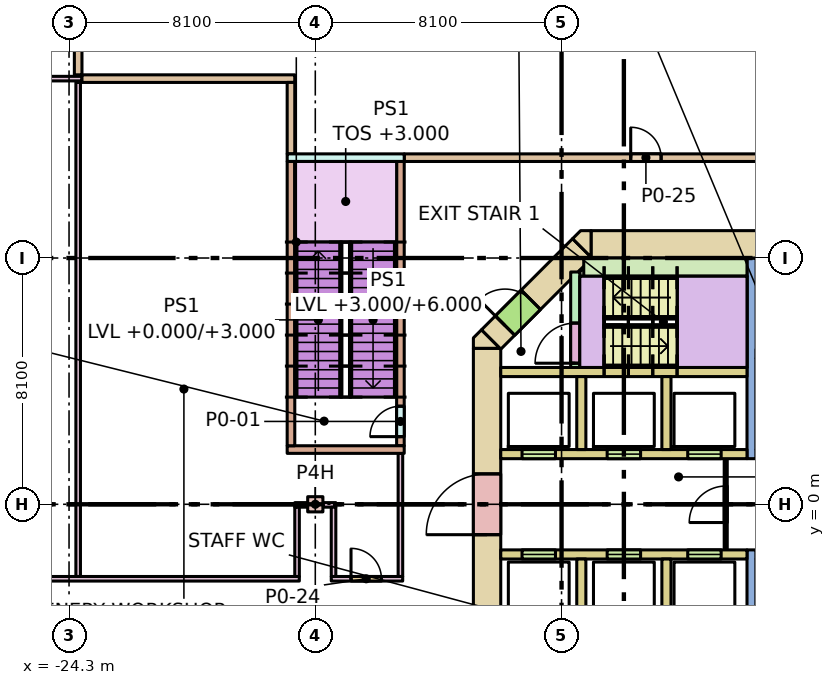
"""IFC4 building model, lengths in metres.
Left out: names, types, materials, properties, quantities, classifications, styles, units other than length and angle.
Written with IfcOpenShell. Run it as: python <this file> out.ifc"""

import sys

from ifc_helpers import new_model, si_unit, direction, frame, frame_2d, origin, origin_2d, place, context, subcontext, project, spatial, polyline, rectangle, outline, extrude, element, fill, save


model = new_model("IFC4")
c1 = context("Model", 3, precision=1e-05, world=origin(), true_north=direction((0.0, 1.0)))
c2 = subcontext(c1, "Body", "Model", "MODEL_VIEW")
j1 = project(units=[si_unit("LENGTHUNIT", "METRE"), si_unit("PLANEANGLEUNIT", "RADIAN")], contexts=[c1])
p1 = place(None, origin())
s1 = spatial("IfcSite", under=j1, at=p1, CompositionType="ELEMENT")
p2 = place(p1, origin())
s2 = spatial("IfcBuilding", under=s1, at=p2, CompositionType="ELEMENT")
p3 = place(p2, origin())
s3 = spatial("IfcBuildingStorey", under=s2, at=p3, CompositionType="ELEMENT", Elevation=0.0)
p4 = place(p3, frame((-16.2, 0.0, 0.0), z_axis=(0.0, 0.0, 1.0), x_axis=(1.0, 0.0, 0.0)))
e1 = element("IfcColumn", 1, at=p4, inside=s3, PredefinedType="COLUMN", context=c2, shape_type="SweptSolid", body=[
    extrude(rectangle(XDim=0.5, YDim=0.5, at=origin_2d()), origin(), (0.0, 0.0, 1.0), 6.0),
])
p5 = place(p3, frame((-7.13, 8.55, -0.32), z_axis=(0.0, 0.0, 1.0), x_axis=(1.0, 0.0, 0.0)))
e2 = element("IfcWall", 2, at=p5, inside=s3, PredefinedType="SHEAR", context=c2, shape_type="SweptSolid", body=[
    extrude(rectangle(XDim=14.26, YDim=0.9, at=frame_2d((7.13, 0.0))), origin(), (0.0, 0.0, 1.0), 6.0),
])
p6 = place(p5, frame((5.48, 0.0, 0.32)))
e3 = element("IfcOpeningElement", 3, at=p6, cuts=e2, PredefinedType="OPENING", context=c2, shape_type="SweptSolid", body=[
    extrude(rectangle(XDim=0.7, YDim=2.1, at=frame_2d((0.35, 1.05))), frame((0.0, 0.46, 0.0), z_axis=(0.0, -1.0, 0.0), x_axis=(1.0, 0.0, 0.0)), (0.0, 0.0, 1.0), 0.92),
])
p7 = place(p5, frame((7.155, 0.0, 0.32)))
e4 = element("IfcOpeningElement", 4, at=p7, cuts=e2, PredefinedType="OPENING", context=c2, shape_type="SweptSolid", body=[
    extrude(rectangle(XDim=0.9, YDim=2.1, at=frame_2d((0.45, 1.05))), frame((0.0, 0.46, 0.0), z_axis=(0.0, -1.0, 0.0), x_axis=(1.0, 0.0, 0.0)), (0.0, 0.0, 1.0), 0.92),
])
p8 = place(p3, frame((-10.55, -5.13, -0.32), z_axis=(0.0, 0.0, 1.0), x_axis=(0.0, 1.0, 0.0)))
e5 = element("IfcWall", 5, at=p8, inside=s3, PredefinedType="SHEAR", context=c2, shape_type="SweptSolid", body=[
    extrude(rectangle(XDim=10.26, YDim=0.9, at=frame_2d((5.13, 0.0))), origin(), (0.0, 0.0, 1.0), 6.0),
])
p9 = place(p8, frame((4.13, 0.0, 0.32)))
e6 = element("IfcOpeningElement", 6, at=p9, cuts=e5, PredefinedType="OPENING", context=c2, shape_type="SweptSolid", body=[
    extrude(rectangle(XDim=2.0, YDim=2.1, at=frame_2d((1.0, 1.05))), frame((0.0, 0.46, 0.0), z_axis=(0.0, -1.0, 0.0), x_axis=(1.0, 0.0, 0.0)), (0.0, 0.0, 1.0), 0.92),
])
p10 = place(p3, frame((-10.418, 5.418, -0.32), z_axis=(0.0, 0.0, 1.0), x_axis=(0.707106781187, 0.707106781187, 0.0)))
e7 = element("IfcWall", 7, at=p10, inside=s3, PredefinedType="SHEAR", context=c2, shape_type="SweptSolid", body=[
    extrude(rectangle(XDim=4.243, YDim=0.9, at=frame_2d((2.121, 0.0))), origin(), (0.0, 0.0, 1.0), 6.0),
])
p11 = place(p10, frame((0.65, 0.0, 0.32)))
e8 = element("IfcOpeningElement", 8, at=p11, cuts=e7, PredefinedType="OPENING", context=c2, shape_type="SweptSolid", body=[
    extrude(rectangle(XDim=1.2, YDim=2.1, at=frame_2d((0.6, 1.05))), frame((0.0, 0.46, 0.0), z_axis=(0.0, -1.0, 0.0), x_axis=(1.0, 0.0, 0.0)), (0.0, 0.0, 1.0), 0.92),
])
p12 = place(p3, frame((0.0, 0.0, -0.32)))
e9 = element("IfcWall", 9, at=p12, inside=s3, PredefinedType="SHEAR", context=c2, shape_type="SweptSolid", body=[
    extrude(outline(polyline([(-10.736, 5.736), (-10.13, 5.13), (-11.0, 5.13), (-11.0, 5.473), (-10.736, 5.736)])), origin(), (0.0, 0.0, 1.0), 6.0),
])
p13 = place(p3, frame((0.0, 0.0, -0.32)))
e10 = element("IfcWall", 10, at=p13, inside=s3, PredefinedType="SHEAR", context=c2, shape_type="SweptSolid", body=[
    extrude(outline(polyline([(-7.473, 9.0), (-7.13, 9.0), (-7.13, 8.13), (-7.736, 8.736), (-7.473, 9.0)])), origin(), (0.0, 0.0, 1.0), 6.0),
])
p14 = place(p3, frame((-10.1, 4.35, 0.0), z_axis=(0.0, 0.0, 1.0), x_axis=(1.0, 0.0, 0.0)))
e11 = element("IfcWall", 11, at=p14, inside=s3, PredefinedType="SOLIDWALL", context=c2, shape_type="SweptSolid", body=[
    extrude(rectangle(XDim=8.1, YDim=0.3, at=frame_2d((4.05, 0.0))), origin(), (0.0, 0.0, 1.0), 5.68),
])
p15 = place(p3, frame((-10.1, 1.65, 0.0), z_axis=(0.0, 0.0, 1.0), x_axis=(1.0, 0.0, 0.0)))
e12 = element("IfcWall", 12, at=p15, inside=s3, PredefinedType="SOLIDWALL", context=c2, shape_type="SweptSolid", body=[
    extrude(rectangle(XDim=8.1, YDim=0.3, at=frame_2d((4.05, 0.0))), origin(), (0.0, 0.0, 1.0), 5.68),
])
p16 = place(p15, frame((0.7, 0.0, 0.0)))
e13 = element("IfcOpeningElement", 13, at=p16, cuts=e12, PredefinedType="OPENING", context=c2, shape_type="SweptSolid", body=[
    extrude(rectangle(XDim=1.1, YDim=2.1, at=frame_2d((0.55, 1.05))), frame((0.0, 0.16, 0.0), z_axis=(0.0, -1.0, 0.0), x_axis=(1.0, 0.0, 0.0)), (0.0, 0.0, 1.0), 0.32),
])
p17 = place(p15, frame((3.5, 0.0, 0.0)))
e14 = element("IfcOpeningElement", 14, at=p17, cuts=e12, PredefinedType="OPENING", context=c2, shape_type="SweptSolid", body=[
    extrude(rectangle(XDim=1.1, YDim=2.1, at=frame_2d((0.55, 1.05))), frame((0.0, 0.16, 0.0), z_axis=(0.0, -1.0, 0.0), x_axis=(1.0, 0.0, 0.0)), (0.0, 0.0, 1.0), 0.32),
])
p18 = place(p15, frame((6.15, 0.0, 0.0)))
e15 = element("IfcOpeningElement", 15, at=p18, cuts=e12, PredefinedType="OPENING", context=c2, shape_type="SweptSolid", body=[
    extrude(rectangle(XDim=1.1, YDim=2.1, at=frame_2d((0.55, 1.05))), frame((0.0, 0.16, 0.0), z_axis=(0.0, -1.0, 0.0), x_axis=(1.0, 0.0, 0.0)), (0.0, 0.0, 1.0), 0.32),
])
p19 = place(p3, frame((-10.1, -1.65, 0.0), z_axis=(0.0, 0.0, 1.0), x_axis=(1.0, 0.0, 0.0)))
e16 = element("IfcWall", 16, at=p19, inside=s3, PredefinedType="SOLIDWALL", context=c2, shape_type="SweptSolid", body=[
    extrude(rectangle(XDim=8.1, YDim=0.3, at=frame_2d((4.05, 0.0))), origin(), (0.0, 0.0, 1.0), 5.68),
])
p20 = place(p19, frame((0.7, 0.0, 0.0)))
e17 = element("IfcOpeningElement", 17, at=p20, cuts=e16, PredefinedType="OPENING", context=c2, shape_type="SweptSolid", body=[
    extrude(rectangle(XDim=1.1, YDim=2.1, at=frame_2d((0.55, 1.05))), frame((0.0, 0.16, 0.0), z_axis=(0.0, -1.0, 0.0), x_axis=(1.0, 0.0, 0.0)), (0.0, 0.0, 1.0), 0.32),
])
p21 = place(p19, frame((3.5, 0.0, 0.0)))
e18 = element("IfcOpeningElement", 18, at=p21, cuts=e16, PredefinedType="OPENING", context=c2, shape_type="SweptSolid", body=[
    extrude(rectangle(XDim=1.1, YDim=2.1, at=frame_2d((0.55, 1.05))), frame((0.0, 0.16, 0.0), z_axis=(0.0, -1.0, 0.0), x_axis=(1.0, 0.0, 0.0)), (0.0, 0.0, 1.0), 0.32),
])
p22 = place(p19, frame((6.15, 0.0, 0.0)))
e19 = element("IfcOpeningElement", 19, at=p22, cuts=e16, PredefinedType="OPENING", context=c2, shape_type="SweptSolid", body=[
    extrude(rectangle(XDim=1.1, YDim=2.1, at=frame_2d((0.55, 1.05))), frame((0.0, 0.16, 0.0), z_axis=(0.0, -1.0, 0.0), x_axis=(1.0, 0.0, 0.0)), (0.0, 0.0, 1.0), 0.32),
])
for number, where, z_axis, x_axis in (
    (20, (-7.45, 1.8, 0.0), (0.0, 0.0, 1.0), (0.0, 1.0, 0.0)),
    (21, (-7.45, -4.2, 0.0), (0.0, 0.0, 1.0), (0.0, 1.0, 0.0)),
    (22, (-4.65, 1.8, 0.0), (0.0, 0.0, 1.0), (0.0, 1.0, 0.0)),
    (23, (-4.65, -4.2, 0.0), (0.0, 0.0, 1.0), (0.0, 1.0, 0.0)),
):
    element("IfcWall", number, at=place(p3, frame(where, z_axis=z_axis, x_axis=x_axis)), inside=s3, PredefinedType="SOLIDWALL", context=c2, shape_type="SweptSolid", body=[
        extrude(rectangle(XDim=2.4, YDim=0.3, at=frame_2d((1.2, 0.0))), origin(), (0.0, 0.0, 1.0), 5.68),
    ])
for number, where, z_axis, x_axis in (
    (24, (-1.85, 1.5, 0.0), (0.0, 0.0, 1.0), (0.0, 1.0, 0.0)),
    (25, (-1.85, -8.1, 0.0), (0.0, 0.0, 1.0), (0.0, 1.0, 0.0)),
):
    element("IfcWall", number, at=place(p3, frame(where, z_axis=z_axis, x_axis=x_axis)), inside=s3, PredefinedType="SHEAR", context=c2, shape_type="SweptSolid", body=[
        extrude(rectangle(XDim=6.6, YDim=0.3, at=frame_2d((3.3, 0.0))), origin(), (0.0, 0.0, 1.0), 5.68),
    ])
p23 = place(p3, frame((-7.65, 4.5, 0.0), z_axis=(0.0, 0.0, 1.0), x_axis=(0.0, 1.0, 0.0)))
e26 = element("IfcWall", 26, at=p23, inside=s3, PredefinedType="SHEAR", context=c2, shape_type="SweptSolid", body=[
    extrude(rectangle(XDim=3.14, YDim=0.3, at=frame_2d((1.57, 0.0))), origin(), (0.0, 0.0, 1.0), 5.68),
])
p24 = place(p23, frame((0.14, 0.0, 0.0)))
e27 = element("IfcOpeningElement", 27, at=p24, cuts=e26, PredefinedType="OPENING", context=c2, shape_type="SweptSolid", body=[
    extrude(rectangle(XDim=1.32, YDim=2.1, at=frame_2d((0.66, 1.05))), frame((0.0, 0.16, 0.0), z_axis=(0.0, -1.0, 0.0), x_axis=(1.0, 0.0, 0.0)), (0.0, 0.0, 1.0), 0.32),
])
p25 = place(p3, frame((-7.37, 7.8, 0.0), z_axis=(0.0, 0.0, 1.0), x_axis=(1.0, 0.0, 0.0)))
e28 = element("IfcWall", 28, at=p25, inside=s3, PredefinedType="SHEAR", context=c2, shape_type="SweptSolid", body=[
    extrude(rectangle(XDim=5.37, YDim=0.6, at=frame_2d((2.685, 0.0))), origin(), (0.0, 0.0, 1.0), 5.68),
])
p26 = place(p3, frame((-7.5, 7.6, 0.0), z_axis=(0.0, 0.0, 1.0), x_axis=(1.0, 0.0, 0.0)))
e29 = element("IfcWall", 29, at=p26, inside=s3, PredefinedType="SHEAR", context=c2, shape_type="SweptSolid", body=[
    extrude(rectangle(XDim=0.6, YDim=0.2, at=frame_2d((0.3, 0.0))), origin(), (0.0, 0.0, 1.0), 5.68),
])
p27 = place(p3, frame((-2.7, -1.5, 0.0), z_axis=(0.0, 0.0, 1.0), x_axis=(0.0, 1.0, 0.0)))
e30 = element("IfcWall", 30, at=p27, inside=s3, PredefinedType="PARTITIONING", context=c2, shape_type="SweptSolid", body=[
    extrude(rectangle(XDim=3.0, YDim=0.1, at=frame_2d((1.5, 0.0))), origin(), (0.0, 0.0, 1.0), 5.68),
])
p28 = place(p27, frame((0.9, 0.0, 0.0)))
e31 = element("IfcOpeningElement", 31, at=p28, cuts=e30, PredefinedType="OPENING", context=c2, shape_type="SweptSolid", body=[
    extrude(rectangle(XDim=1.2, YDim=2.1, at=frame_2d((0.6, 1.05))), frame((0.0, 0.06, 0.0), z_axis=(0.0, -1.0, 0.0), x_axis=(1.0, 0.0, 0.0)), (0.0, 0.0, 1.0), 0.12),
])
p29 = place(p3, frame((-37.5, 14.0, 0.0), z_axis=(0.0, 0.0, 1.0), x_axis=(1.0, 0.0, 0.0)))
e32 = element("IfcWall", 32, at=p29, inside=s3, PredefinedType="PARTITIONING", context=c2, shape_type="SweptSolid", body=[
    extrude(rectangle(XDim=13.625, YDim=0.15, at=frame_2d((6.812, 0.0))), origin(), (0.0, 0.0, 1.0), 5.68),
])
p30 = place(p29, frame((5.95, 0.0, 0.0)))
e33 = element("IfcOpeningElement", 33, at=p30, cuts=e32, PredefinedType="OPENING", context=c2, shape_type="SweptSolid", body=[
    extrude(rectangle(XDim=1.8, YDim=2.4, at=frame_2d((0.9, 1.2))), frame((0.0, 0.085, 0.0), z_axis=(0.0, -1.0, 0.0), x_axis=(1.0, 0.0, 0.0)), (0.0, 0.0, 1.0), 0.17),
])
p31 = place(p3, frame((-24.0, -2.375, 0.0), z_axis=(0.0, 0.0, 1.0), x_axis=(0.0, 1.0, 0.0)))
e34 = element("IfcWall", 34, at=p31, inside=s3, PredefinedType="PARTITIONING", context=c2, shape_type="SweptSolid", body=[
    extrude(rectangle(XDim=16.25, YDim=0.15, at=frame_2d((8.125, 0.0))), origin(), (0.0, 0.0, 1.0), 5.68),
])
p32 = place(p3, frame((-25.425, -2.45, 0.0), z_axis=(0.0, 0.0, 1.0), x_axis=(1.0, 0.0, 0.0)))
e35 = element("IfcWall", 35, at=p32, inside=s3, PredefinedType="PARTITIONING", context=c2, shape_type="SweptSolid", body=[
    extrude(rectangle(XDim=8.7, YDim=0.15, at=frame_2d((4.35, 0.0))), origin(), (0.0, 0.0, 1.0), 5.68),
])
p33 = place(p3, frame((-24.0, 14.125, 0.0), z_axis=(0.0, 0.0, 1.0), x_axis=(0.0, 1.0, 0.0)))
e36 = element("IfcWall", 36, at=p33, inside=s3, PredefinedType="PARTITIONING", context=c2, shape_type="SweptSolid", body=[
    extrude(rectangle(XDim=1.815, YDim=0.25, at=frame_2d((0.907, 0.0))), origin(), (0.0, 0.0, 1.0), 5.68),
])
p34 = place(p3, frame((-17.125, 11.4, 0.0), z_axis=(0.0, 0.0, 1.0), x_axis=(1.0, 0.0, 0.0)))
e37 = element("IfcWall", 37, at=p34, inside=s3, PredefinedType="STANDARD", context=c2, shape_type="SweptSolid", body=[
    extrude(rectangle(XDim=3.85, YDim=0.25, at=frame_2d((1.925, 0.0))), origin(), (0.0, 0.0, 1.0), 5.68),
])
p35 = place(p3, frame((-13.275, 11.4, 0.0), z_axis=(0.0, 0.0, 1.0), x_axis=(1.0, 0.0, 0.0)))
e38 = element("IfcWall", 38, at=p35, inside=s3, PredefinedType="PARTITIONING", context=c2, shape_type="SweptSolid", body=[
    extrude(rectangle(XDim=15.85, YDim=0.25, at=frame_2d((7.925, 0.0))), origin(), (0.0, 0.0, 1.0), 5.68),
])
p36 = place(p35, frame((7.45, 0.0, 0.0)))
e39 = element("IfcOpeningElement", 39, at=p36, cuts=e38, PredefinedType="OPENING", context=c2, shape_type="SweptSolid", body=[
    extrude(rectangle(XDim=1.0, YDim=2.1, at=frame_2d((0.5, 1.05))), frame((0.0, 0.135, 0.0), z_axis=(0.0, -1.0, 0.0), x_axis=(1.0, 0.0, 0.0)), (0.0, 0.0, 1.0), 0.27),
])
p37 = place(p3, frame((-23.875, 14.0, 0.0), z_axis=(0.0, 0.0, 1.0), x_axis=(1.0, 0.0, 0.0)))
e40 = element("IfcWall", 40, at=p37, inside=s3, PredefinedType="PARTITIONING", context=c2, shape_type="SweptSolid", body=[
    extrude(rectangle(XDim=7.0, YDim=0.25, at=frame_2d((3.5, 0.0))), origin(), (0.0, 0.0, 1.0), 5.68),
])
p38 = place(p3, frame((-17.0, 11.525, 0.0), z_axis=(0.0, 0.0, 1.0), x_axis=(0.0, 1.0, 0.0)))
e41 = element("IfcWall", 41, at=p38, inside=s3, PredefinedType="PARTITIONING", context=c2, shape_type="SweptSolid", body=[
    extrude(rectangle(XDim=2.35, YDim=0.25, at=frame_2d((1.175, 0.0))), origin(), (0.0, 0.0, 1.0), 5.68),
])
p39 = place(p3, frame((-13.4, 1.925, 0.0), z_axis=(0.0, 0.0, 1.0), x_axis=(0.0, 1.0, 0.0)))
e42 = element("IfcWall", 42, at=p39, inside=s3, PredefinedType="STANDARD", context=c2, shape_type="SweptSolid", body=[
    extrude(rectangle(XDim=9.35, YDim=0.25, at=frame_2d((4.675, 0.0))), origin(), (0.0, 0.0, 1.0), 5.68),
])
p40 = place(p39, frame((0.3, 0.0, 0.0)))
e43 = element("IfcOpeningElement", 43, at=p40, cuts=e42, PredefinedType="OPENING", context=c2, shape_type="SweptSolid", body=[
    extrude(rectangle(XDim=1.0, YDim=2.1, at=frame_2d((0.5, 1.05))), frame((0.0, 0.135, 0.0), z_axis=(0.0, -1.0, 0.0), x_axis=(1.0, 0.0, 0.0)), (0.0, 0.0, 1.0), 0.27),
])
p41 = place(p3, frame((-17.125, 1.8, 0.0), z_axis=(0.0, 0.0, 1.0), x_axis=(1.0, 0.0, 0.0)))
e44 = element("IfcWall", 44, at=p41, inside=s3, PredefinedType="STANDARD", context=c2, shape_type="SweptSolid", body=[
    extrude(rectangle(XDim=3.85, YDim=0.25, at=frame_2d((1.925, 0.0))), origin(), (0.0, 0.0, 1.0), 5.68),
])
p42 = place(p3, frame((-17.0, 1.925, 0.0), z_axis=(0.0, 0.0, 1.0), x_axis=(0.0, 1.0, 0.0)))
e45 = element("IfcWall", 45, at=p42, inside=s3, PredefinedType="STANDARD", context=c2, shape_type="SweptSolid", body=[
    extrude(rectangle(XDim=9.35, YDim=0.25, at=frame_2d((4.675, 0.0))), origin(), (0.0, 0.0, 1.0), 5.68),
])
p43 = place(p3, frame((-13.4, -2.375, 0.0), z_axis=(0.0, 0.0, 1.0), x_axis=(0.0, 1.0, 0.0)))
e46 = element("IfcWall", 46, at=p43, inside=s3, PredefinedType="PARTITIONING", context=c2, shape_type="SweptSolid", body=[
    extrude(rectangle(XDim=4.05, YDim=0.15, at=frame_2d((2.025, 0.0))), origin(), (0.0, 0.0, 1.0), 5.68),
])
p44 = place(p3, frame((-15.675, -2.45, 0.0), z_axis=(0.0, 0.0, 1.0), x_axis=(1.0, 0.0, 0.0)))
e47 = element("IfcWall", 47, at=p44, inside=s3, PredefinedType="PARTITIONING", context=c2, shape_type="SweptSolid", body=[
    extrude(rectangle(XDim=2.35, YDim=0.15, at=frame_2d((1.175, 0.0))), origin(), (0.0, 0.0, 1.0), 5.68),
])
p45 = place(p44, frame((0.65, 0.0, 0.0)))
e48 = element("IfcOpeningElement", 48, at=p45, cuts=e47, PredefinedType="OPENING", context=c2, shape_type="SweptSolid", body=[
    extrude(rectangle(XDim=1.0, YDim=2.1, at=frame_2d((0.5, 1.05))), frame((0.0, 0.085, 0.0), z_axis=(0.0, -1.0, 0.0), x_axis=(1.0, 0.0, 0.0)), (0.0, 0.0, 1.0), 0.17),
])
for number, where, z_axis, x_axis in (
    (49, (-16.875, -0.02, 0.0), (0.0, 0.0, 1.0), (1.0, 0.0, 0.0)),
    (50, (-15.94, -0.02, 0.0), (0.0, 0.0, 1.0), (1.0, 0.0, 0.0)),
):
    element("IfcWall", number, at=place(p3, frame(where, z_axis=z_axis, x_axis=x_axis)), inside=s3, PredefinedType="PARTITIONING", context=c2, shape_type="SweptSolid", body=[
        extrude(rectangle(XDim=0.415, YDim=0.15, at=frame_2d((0.208, 0.0))), origin(), (0.0, 0.0, 1.0), 5.68),
    ])
for number, where, z_axis, x_axis in (
    (51, (-16.8, -2.375, 0.0), (0.0, 0.0, 1.0), (0.0, 1.0, 0.0)),
    (52, (-15.6, -2.375, 0.0), (0.0, 0.0, 1.0), (0.0, 1.0, 0.0)),
):
    element("IfcWall", number, at=place(p3, frame(where, z_axis=z_axis, x_axis=x_axis)), inside=s3, PredefinedType="PARTITIONING", context=c2, shape_type="SweptSolid", body=[
        extrude(rectangle(XDim=2.28, YDim=0.15, at=frame_2d((1.14, 0.0))), origin(), (0.0, 0.0, 1.0), 5.68),
    ])
p46 = place(p16, origin())
e53 = element("IfcDoor", 53, at=p46, inside=s3, OperationType="DOUBLE_DOOR_SLIDING", PredefinedType="DOOR", context=c2, shape_type="SweptSolid", body=[
    extrude(rectangle(XDim=1.1, YDim=2.1, at=frame_2d((0.55, 1.05))), frame((0.0, 0.025, 0.0), z_axis=(0.0, -1.0, 0.0), x_axis=(1.0, 0.0, 0.0)), (0.0, 0.0, 1.0), 0.05),
])
fill(e13, e53)
p47 = place(p17, origin())
e54 = element("IfcDoor", 54, at=p47, inside=s3, OperationType="DOUBLE_DOOR_SLIDING", PredefinedType="DOOR", context=c2, shape_type="SweptSolid", body=[
    extrude(rectangle(XDim=1.1, YDim=2.1, at=frame_2d((0.55, 1.05))), frame((0.0, 0.025, 0.0), z_axis=(0.0, -1.0, 0.0), x_axis=(1.0, 0.0, 0.0)), (0.0, 0.0, 1.0), 0.05),
])
fill(e14, e54)
p48 = place(p18, origin())
e55 = element("IfcDoor", 55, at=p48, inside=s3, OperationType="DOUBLE_DOOR_SLIDING", PredefinedType="DOOR", context=c2, shape_type="SweptSolid", body=[
    extrude(rectangle(XDim=1.1, YDim=2.1, at=frame_2d((0.55, 1.05))), frame((0.0, 0.025, 0.0), z_axis=(0.0, -1.0, 0.0), x_axis=(1.0, 0.0, 0.0)), (0.0, 0.0, 1.0), 0.05),
])
fill(e15, e55)
p49 = place(p20, origin())
e56 = element("IfcDoor", 56, at=p49, inside=s3, OperationType="DOUBLE_DOOR_SLIDING", PredefinedType="DOOR", context=c2, shape_type="SweptSolid", body=[
    extrude(rectangle(XDim=1.1, YDim=2.1, at=frame_2d((0.55, 1.05))), frame((0.0, 0.025, 0.0), z_axis=(0.0, -1.0, 0.0), x_axis=(1.0, 0.0, 0.0)), (0.0, 0.0, 1.0), 0.05),
])
fill(e17, e56)
p50 = place(p21, origin())
e57 = element("IfcDoor", 57, at=p50, inside=s3, OperationType="DOUBLE_DOOR_SLIDING", PredefinedType="DOOR", context=c2, shape_type="SweptSolid", body=[
    extrude(rectangle(XDim=1.1, YDim=2.1, at=frame_2d((0.55, 1.05))), frame((0.0, 0.025, 0.0), z_axis=(0.0, -1.0, 0.0), x_axis=(1.0, 0.0, 0.0)), (0.0, 0.0, 1.0), 0.05),
])
fill(e18, e57)
p51 = place(p22, origin())
e58 = element("IfcDoor", 58, at=p51, inside=s3, OperationType="DOUBLE_DOOR_SLIDING", PredefinedType="DOOR", context=c2, shape_type="SweptSolid", body=[
    extrude(rectangle(XDim=1.1, YDim=2.1, at=frame_2d((0.55, 1.05))), frame((0.0, 0.025, 0.0), z_axis=(0.0, -1.0, 0.0), x_axis=(1.0, 0.0, 0.0)), (0.0, 0.0, 1.0), 0.05),
])
fill(e19, e58)
p52 = place(p24, origin())
e59 = element("IfcDoor", 59, at=p52, inside=s3, OperationType="DOUBLE_DOOR_SINGLE_SWING", PredefinedType="DOOR", context=c2, shape_type="SweptSolid", body=[
    extrude(rectangle(XDim=1.32, YDim=2.1, at=frame_2d((0.66, 1.05))), frame((0.0, 0.025, 0.0), z_axis=(0.0, -1.0, 0.0), x_axis=(1.0, 0.0, 0.0)), (0.0, 0.0, 1.0), 0.05),
])
fill(e27, e59)
p53 = place(p11, origin())
e60 = element("IfcDoor", 60, at=p53, inside=s3, OperationType="SINGLE_SWING_LEFT", PredefinedType="DOOR", context=c2, shape_type="SweptSolid", body=[
    extrude(rectangle(XDim=1.2, YDim=2.1, at=frame_2d((0.6, 1.05))), frame((0.0, 0.025, 0.0), z_axis=(0.0, -1.0, 0.0), x_axis=(1.0, 0.0, 0.0)), (0.0, 0.0, 1.0), 0.05),
])
fill(e8, e60)
p54 = place(p9, origin())
e61 = element("IfcDoor", 61, at=p54, inside=s3, OperationType="DOUBLE_DOOR_SINGLE_SWING", PredefinedType="DOOR", context=c2, shape_type="SweptSolid", body=[
    extrude(rectangle(XDim=2.0, YDim=2.1, at=frame_2d((1.0, 1.05))), frame((0.0, 0.025, 0.0), z_axis=(0.0, -1.0, 0.0), x_axis=(1.0, 0.0, 0.0)), (0.0, 0.0, 1.0), 0.05),
])
fill(e6, e61)
p55 = place(p28, origin())
e62 = element("IfcDoor", 62, at=p55, inside=s3, OperationType="SINGLE_SWING_LEFT", PredefinedType="DOOR", context=c2, shape_type="SweptSolid", body=[
    extrude(rectangle(XDim=1.2, YDim=2.1, at=frame_2d((0.6, 1.05))), frame((0.0, 0.025, 0.0), z_axis=(0.0, -1.0, 0.0), x_axis=(1.0, 0.0, 0.0)), (0.0, 0.0, 1.0), 0.05),
])
fill(e31, e62)
p56 = place(p40, origin())
e63 = element("IfcDoor", 63, at=p56, inside=s3, OperationType="SINGLE_SWING_LEFT", PredefinedType="DOOR", context=c2, shape_type="SweptSolid", body=[
    extrude(rectangle(XDim=1.0, YDim=2.1, at=frame_2d((0.5, 1.05))), frame((0.0, 0.025, 0.0), z_axis=(0.0, -1.0, 0.0), x_axis=(1.0, 0.0, 0.0)), (0.0, 0.0, 1.0), 0.05),
])
fill(e43, e63)
p57 = place(p45, origin())
e64 = element("IfcDoor", 64, at=p57, inside=s3, OperationType="SINGLE_SWING_LEFT", PredefinedType="DOOR", context=c2, shape_type="SweptSolid", body=[
    extrude(rectangle(XDim=1.0, YDim=2.1, at=frame_2d((0.5, 1.05))), frame((0.0, 0.025, 0.0), z_axis=(0.0, -1.0, 0.0), x_axis=(1.0, 0.0, 0.0)), (0.0, 0.0, 1.0), 0.05),
])
fill(e48, e64)
p58 = place(p36, origin())
e65 = element("IfcDoor", 65, at=p58, inside=s3, OperationType="SINGLE_SWING_LEFT", PredefinedType="DOOR", context=c2, shape_type="SweptSolid", body=[
    extrude(rectangle(XDim=1.0, YDim=2.1, at=frame_2d((0.5, 1.05))), frame((0.0, 0.025, 0.0), z_axis=(0.0, -1.0, 0.0), x_axis=(1.0, 0.0, 0.0)), (0.0, 0.0, 1.0), 0.05),
])
fill(e39, e65)
save(model, sys.argv[1])
